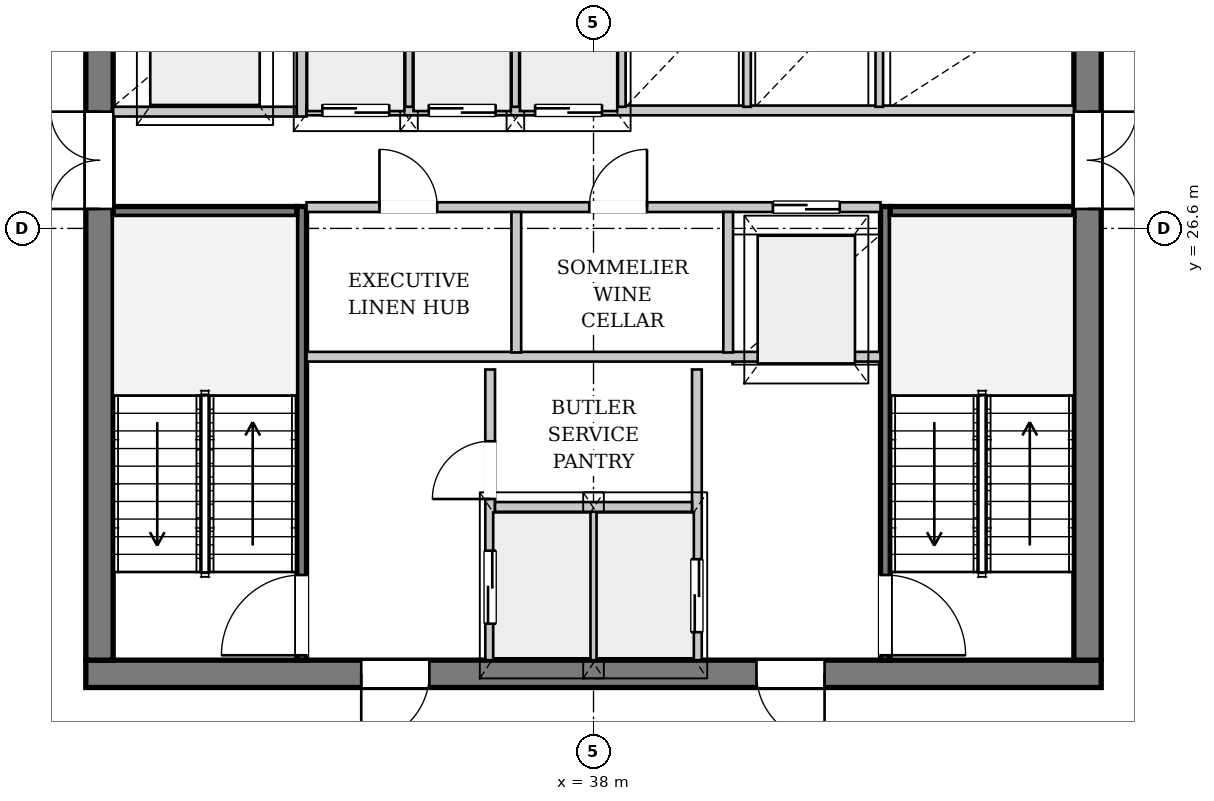
"""IFC4 building model, lengths in metres.
Left out: names, types, materials, properties, quantities, classifications, styles, units other than length and angle.
Written with IfcOpenShell. Run it as: python <this file> out.ifc"""

import sys

from ifc_helpers import new_model, si_unit, direction, frame, frame_2d, origin, place, context, subcontext, project, spatial, rectangle, extrude, source, transform, mapped, element, fill, save


model = new_model("IFC4")
c1 = context("Model", 3, precision=1e-05, world=origin(), true_north=direction((0.0, 1.0)))
c2 = subcontext(c1, "Body", "Model", "MODEL_VIEW")
j1 = project(units=[si_unit("LENGTHUNIT", "METRE"), si_unit("PLANEANGLEUNIT", "RADIAN")], contexts=[c1])
p1 = place(None, origin())
s1 = spatial("IfcSite", under=j1, at=p1, CompositionType="ELEMENT")
p2 = place(p1, origin())
s2 = spatial("IfcBuilding", under=s1, at=p2, CompositionType="ELEMENT")
p3 = place(p2, frame((0.0, 0.0, 216.7)))
s3 = spatial("IfcBuildingStorey", under=s2, at=p3, CompositionType="ELEMENT", Elevation=216.7)
p4 = place(p3, frame((52.937, 23.49, 0.0), z_axis=(0.0, 0.0, 1.0), x_axis=(-0.479001143565, -0.877814276748, 0.0)))
e1 = element("IfcWall", 1, at=p4, inside=s3, PredefinedType="SOLIDWALL", context=c2, shape_type="SweptSolid", body=[
    extrude(rectangle(XDim=23.072, YDim=0.32, at=frame_2d((11.536, 0.0))), origin(), (0.0, 0.0, 1.0), 2.822),
])
p5 = place(p4, frame((6.633, 0.0, 0.0)))
e2 = element("IfcOpeningElement", 2, at=p5, cuts=e1, PredefinedType="OPENING", context=c2, shape_type="SweptSolid", body=[
    extrude(rectangle(XDim=1.5, YDim=2.3, at=frame_2d((0.75, 1.15))), frame((0.0, 0.17, 0.0), z_axis=(0.0, -1.0, 0.0), x_axis=(1.0, 0.0, 0.0)), (0.0, 0.0, 1.0), 0.34),
])
p6 = place(p4, frame((15.773, 0.0, 0.352)))
e3 = element("IfcOpeningElement", 3, at=p6, cuts=e1, PredefinedType="OPENING", context=c2, shape_type="SweptSolid", body=[
    extrude(rectangle(XDim=2.6, YDim=2.35, at=frame_2d((1.3, 1.175))), frame((0.0, 0.17, 0.0), z_axis=(0.0, -1.0, 0.0), x_axis=(1.0, 0.0, 0.0)), (0.0, 0.0, 1.0), 0.34),
])
p7 = place(p3, frame((43.092, 3.473, 0.0), z_axis=(0.0, 0.0, 1.0), x_axis=(0.473808636285, 0.880627830688, 0.0)))
e4 = element("IfcWall", 4, at=p7, inside=s3, PredefinedType="PARAPET", context=c2, shape_type="SweptSolid", body=[
    extrude(rectangle(XDim=20.551, YDim=0.22, at=frame_2d((10.275, 0.0))), origin(), (0.0, 0.0, 1.0), 0.3),
])
p8 = place(p3, frame((46.35, 19.275, 0.0), z_axis=(0.0, 0.0, 1.0), x_axis=(-1.0, 0.0, 0.0)))
e5 = element("IfcWall", 5, at=p8, inside=s3, PredefinedType="SHEAR", context=c2, shape_type="SweptSolid", body=[
    extrude(rectangle(XDim=16.7, YDim=0.45, at=frame_2d((8.35, 0.0))), origin(), (0.0, 0.0, 1.0), 3.33),
])
p9 = place(p8, frame((4.55, 0.0, 0.0)))
e6 = element("IfcOpeningElement", 6, at=p9, cuts=e5, PredefinedType="OPENING", context=c2, shape_type="SweptSolid", body=[
    extrude(rectangle(XDim=1.12, YDim=2.25, at=frame_2d((0.56, 1.125))), frame((0.0, 0.235, 0.0), z_axis=(0.0, -1.0, 0.0), x_axis=(1.0, 0.0, 0.0)), (0.0, 0.0, 1.0), 0.47),
])
p10 = place(p8, frame((11.05, 0.0, 0.0)))
e7 = element("IfcOpeningElement", 7, at=p10, cuts=e5, PredefinedType="OPENING", context=c2, shape_type="SweptSolid", body=[
    extrude(rectangle(XDim=1.12, YDim=2.25, at=frame_2d((0.56, 1.125))), frame((0.0, 0.235, 0.0), z_axis=(0.0, -1.0, 0.0), x_axis=(1.0, 0.0, 0.0)), (0.0, 0.0, 1.0), 0.47),
])
p11 = place(p3, frame((29.875, 19.5, 0.0), z_axis=(0.0, 0.0, 1.0), x_axis=(0.0, 1.0, 0.0)))
e8 = element("IfcWall", 8, at=p11, inside=s3, PredefinedType="SHEAR", context=c2, shape_type="SweptSolid", body=[
    extrude(rectangle(XDim=14.2, YDim=0.45, at=frame_2d((7.1, 0.0))), origin(), (0.0, 0.0, 1.0), 3.33),
])
p12 = place(p11, frame((7.42, 0.0, 0.0)))
e9 = element("IfcOpeningElement", 9, at=p12, cuts=e8, PredefinedType="OPENING", context=c2, shape_type="SweptSolid", body=[
    extrude(rectangle(XDim=1.6, YDim=2.2, at=frame_2d((0.8, 1.1))), frame((0.0, 0.235, 0.0), z_axis=(0.0, -1.0, 0.0), x_axis=(1.0, 0.0, 0.0)), (0.0, 0.0, 1.0), 0.47),
])
p13 = place(p3, frame((46.125, 33.7, 0.0), z_axis=(0.0, 0.0, 1.0), x_axis=(0.0, -1.0, 0.0)))
e10 = element("IfcWall", 10, at=p13, inside=s3, PredefinedType="SHEAR", context=c2, shape_type="SweptSolid", body=[
    extrude(rectangle(XDim=14.2, YDim=0.45, at=frame_2d((7.1, 0.0))), origin(), (0.0, 0.0, 1.0), 3.33),
])
p14 = place(p13, frame((5.18, 0.0, 0.0)))
e11 = element("IfcOpeningElement", 11, at=p14, cuts=e10, PredefinedType="OPENING", context=c2, shape_type="SweptSolid", body=[
    extrude(rectangle(XDim=1.6, YDim=2.2, at=frame_2d((0.8, 1.1))), frame((0.0, 0.235, 0.0), z_axis=(0.0, -1.0, 0.0), x_axis=(1.0, 0.0, 0.0)), (0.0, 0.0, 1.0), 0.47),
])
p15 = place(p13, frame((2.05, 0.0, 0.0)))
e12 = element("IfcOpeningElement", 12, at=p15, cuts=e10, PredefinedType="OPENING", context=c2, shape_type="SweptSolid", body=[
    extrude(rectangle(XDim=0.95, YDim=2.1, at=frame_2d((0.475, 1.05))), frame((0.0, 0.235, 0.0), z_axis=(0.0, -1.0, 0.0), x_axis=(1.0, 0.0, 0.0)), (0.0, 0.0, 1.0), 0.47),
])
p16 = place(p3, frame((33.2, 19.5, 0.0), z_axis=(0.0, 0.0, 1.0), x_axis=(0.0, 1.0, 0.0)))
e13 = element("IfcWall", 13, at=p16, inside=s3, PredefinedType="PARTITIONING", context=c2, shape_type="SweptSolid", body=[
    extrude(rectangle(XDim=7.46, YDim=0.16, at=frame_2d((3.73, 0.0))), origin(), (0.0, 0.0, 1.0), 3.33),
])
p17 = place(p16, frame((0.08, 0.0, 0.0)))
e14 = element("IfcOpeningElement", 14, at=p17, cuts=e13, PredefinedType="OPENING", context=c2, shape_type="SweptSolid", body=[
    extrude(rectangle(XDim=1.32, YDim=2.2, at=frame_2d((0.66, 1.1))), frame((0.0, 0.09, 0.0), z_axis=(0.0, -1.0, 0.0), x_axis=(1.0, 0.0, 0.0)), (0.0, 0.0, 1.0), 0.18),
])
p18 = place(p3, frame((30.1, 26.88, 0.0), z_axis=(0.0, 0.0, 1.0), x_axis=(1.0, 0.0, 0.0)))
e15 = element("IfcWall", 15, at=p18, inside=s3, PredefinedType="PARTITIONING", context=c2, shape_type="SweptSolid", body=[
    extrude(rectangle(XDim=3.02, YDim=0.16, at=frame_2d((1.51, 0.0))), origin(), (0.0, 0.0, 1.0), 3.33),
])
p19 = place(p3, frame((42.8, 26.96, 0.0), z_axis=(0.0, 0.0, 1.0), x_axis=(0.0, -1.0, 0.0)))
e16 = element("IfcWall", 16, at=p19, inside=s3, PredefinedType="PARTITIONING", context=c2, shape_type="SweptSolid", body=[
    extrude(rectangle(XDim=7.46, YDim=0.16, at=frame_2d((3.73, 0.0))), origin(), (0.0, 0.0, 1.0), 3.33),
])
p20 = place(p19, frame((6.06, 0.0, 0.0)))
e17 = element("IfcOpeningElement", 17, at=p20, cuts=e16, PredefinedType="OPENING", context=c2, shape_type="SweptSolid", body=[
    extrude(rectangle(XDim=1.32, YDim=2.2, at=frame_2d((0.66, 1.1))), frame((0.0, 0.09, 0.0), z_axis=(0.0, -1.0, 0.0), x_axis=(1.0, 0.0, 0.0)), (0.0, 0.0, 1.0), 0.18),
])
p21 = place(p3, frame((42.88, 26.88, 0.0), z_axis=(0.0, 0.0, 1.0), x_axis=(1.0, 0.0, 0.0)))
e18 = element("IfcWall", 18, at=p21, inside=s3, PredefinedType="PARTITIONING", context=c2, shape_type="SweptSolid", body=[
    extrude(rectangle(XDim=3.02, YDim=0.16, at=frame_2d((1.51, 0.0))), origin(), (0.0, 0.0, 1.0), 3.33),
])
p22 = place(p3, frame((36.3, 19.5, 0.0), z_axis=(0.0, 0.0, 1.0), x_axis=(0.0, 1.0, 0.0)))
e19 = element("IfcWall", 19, at=p22, inside=s3, PredefinedType="PARTITIONING", context=c2, shape_type="SweptSolid", body=[
    extrude(rectangle(XDim=4.78, YDim=0.16, at=frame_2d((2.39, 0.0))), origin(), (0.0, 0.0, 1.0), 3.33),
])
p23 = place(p22, frame((0.6, 0.0, 0.0)))
e20 = element("IfcOpeningElement", 20, at=p23, cuts=e19, PredefinedType="OPENING", context=c2, shape_type="SweptSolid", body=[
    extrude(rectangle(XDim=1.2, YDim=2.2, at=frame_2d((0.6, 1.1))), frame((0.0, 0.09, 0.0), z_axis=(0.0, -1.0, 0.0), x_axis=(1.0, 0.0, 0.0)), (0.0, 0.0, 1.0), 0.18),
])
p24 = place(p22, frame((2.65, 0.0, 0.0)))
e21 = element("IfcOpeningElement", 21, at=p24, cuts=e19, PredefinedType="OPENING", context=c2, shape_type="SweptSolid", body=[
    extrude(rectangle(XDim=0.95, YDim=2.1, at=frame_2d((0.475, 1.05))), frame((0.0, 0.09, 0.0), z_axis=(0.0, -1.0, 0.0), x_axis=(1.0, 0.0, 0.0)), (0.0, 0.0, 1.0), 0.18),
])
p25 = place(p3, frame((39.7, 24.28, 0.0), z_axis=(0.0, 0.0, 1.0), x_axis=(0.0, -1.0, 0.0)))
e22 = element("IfcWall", 22, at=p25, inside=s3, PredefinedType="PARTITIONING", context=c2, shape_type="SweptSolid", body=[
    extrude(rectangle(XDim=4.78, YDim=0.16, at=frame_2d((2.39, 0.0))), origin(), (0.0, 0.0, 1.0), 3.33),
])
p26 = place(p25, frame((3.12, 0.0, 0.0)))
e23 = element("IfcOpeningElement", 23, at=p26, cuts=e22, PredefinedType="OPENING", context=c2, shape_type="SweptSolid", body=[
    extrude(rectangle(XDim=1.2, YDim=2.2, at=frame_2d((0.6, 1.1))), frame((0.0, 0.09, 0.0), z_axis=(0.0, -1.0, 0.0), x_axis=(1.0, 0.0, 0.0)), (0.0, 0.0, 1.0), 0.18),
])
p27 = place(p3, frame((38.0, 19.5, 0.0), z_axis=(0.0, 0.0, 1.0), x_axis=(0.0, 1.0, 0.0)))
e24 = element("IfcWall", 24, at=p27, inside=s3, PredefinedType="PARTITIONING", context=c2, shape_type="SweptSolid", body=[
    extrude(rectangle(XDim=2.46, YDim=0.125, at=frame_2d((1.23, 0.0))), origin(), (0.0, 0.0, 1.0), 3.33),
])
p28 = place(p3, frame((36.38, 22.02, 0.0), z_axis=(0.0, 0.0, 1.0), x_axis=(1.0, 0.0, 0.0)))
e25 = element("IfcWall", 25, at=p28, inside=s3, PredefinedType="PARTITIONING", context=c2, shape_type="SweptSolid", body=[
    extrude(rectangle(XDim=3.24, YDim=0.16, at=frame_2d((1.62, 0.0))), origin(), (0.0, 0.0, 1.0), 3.33),
])
p29 = place(p3, frame((33.28, 24.49, 0.0), z_axis=(0.0, 0.0, 1.0), x_axis=(1.0, 0.0, 0.0)))
e26 = element("IfcWall", 26, at=p29, inside=s3, PredefinedType="PARTITIONING", context=c2, shape_type="SweptSolid", body=[
    extrude(rectangle(XDim=9.44, YDim=0.16, at=frame_2d((4.72, 0.0))), origin(), (0.0, 0.0, 1.0), 3.33),
])
p30 = place(p3, frame((30.1, 28.52, 0.0), z_axis=(0.0, 0.0, 1.0), x_axis=(1.0, 0.0, 0.0)))
e27 = element("IfcWall", 27, at=p30, inside=s3, PredefinedType="PARTITIONING", context=c2, shape_type="SweptSolid", body=[
    extrude(rectangle(XDim=3.02, YDim=0.16, at=frame_2d((1.51, 0.0))), origin(), (0.0, 0.0, 1.0), 3.33),
])
p31 = place(p3, frame((33.2, 28.44, 0.0), z_axis=(0.0, 0.0, 1.0), x_axis=(0.0, 1.0, 0.0)))
e28 = element("IfcWall", 28, at=p31, inside=s3, PredefinedType="PARTITIONING", context=c2, shape_type="SweptSolid", body=[
    extrude(rectangle(XDim=5.26, YDim=0.16, at=frame_2d((2.63, 0.0))), origin(), (0.0, 0.0, 1.0), 3.33),
])
p32 = place(p3, frame((33.28, 26.95, 0.0), z_axis=(0.0, 0.0, 1.0), x_axis=(1.0, 0.0, 0.0)))
e29 = element("IfcWall", 29, at=p32, inside=s3, PredefinedType="PARTITIONING", context=c2, shape_type="SweptSolid", body=[
    extrude(rectangle(XDim=9.44, YDim=0.16, at=frame_2d((4.72, 0.0))), origin(), (0.0, 0.0, 1.0), 3.33),
])
p33 = place(p32, frame((1.2, 0.0, 0.0)))
e30 = element("IfcOpeningElement", 30, at=p33, cuts=e29, PredefinedType="OPENING", context=c2, shape_type="SweptSolid", body=[
    extrude(rectangle(XDim=0.95, YDim=2.1, at=frame_2d((0.475, 1.05))), frame((0.0, 0.09, 0.0), z_axis=(0.0, -1.0, 0.0), x_axis=(1.0, 0.0, 0.0)), (0.0, 0.0, 1.0), 0.18),
])
p34 = place(p32, frame((4.65, 0.0, 0.0)))
e31 = element("IfcOpeningElement", 31, at=p34, cuts=e29, PredefinedType="OPENING", context=c2, shape_type="SweptSolid", body=[
    extrude(rectangle(XDim=0.95, YDim=2.1, at=frame_2d((0.475, 1.05))), frame((0.0, 0.09, 0.0), z_axis=(0.0, -1.0, 0.0), x_axis=(1.0, 0.0, 0.0)), (0.0, 0.0, 1.0), 0.18),
])
p35 = place(p32, frame((7.67, 0.0, 0.0)))
e32 = element("IfcOpeningElement", 32, at=p35, cuts=e29, PredefinedType="OPENING", context=c2, shape_type="SweptSolid", body=[
    extrude(rectangle(XDim=1.1, YDim=2.2, at=frame_2d((0.55, 1.1))), frame((0.0, 0.09, 0.0), z_axis=(0.0, -1.0, 0.0), x_axis=(1.0, 0.0, 0.0)), (0.0, 0.0, 1.0), 0.18),
])
for number, where, z_axis, x_axis in (
    (33, (36.73, 24.56, 0.0), (0.0, 0.0, 1.0), (0.0, 1.0, 0.0)),
    (34, (40.215, 24.56, 0.0), (0.0, 0.0, 1.0), (0.0, 1.0, 0.0)),
):
    element("IfcWall", number, at=place(p3, frame(where, z_axis=z_axis, x_axis=x_axis)), inside=s3, PredefinedType="PARTITIONING", context=c2, shape_type="SweptSolid", body=[
        extrude(rectangle(XDim=2.31, YDim=0.16, at=frame_2d((1.155, 0.0))), origin(), (0.0, 0.0, 1.0), 3.33),
    ])
p36 = place(p3, frame((33.28, 28.54, 0.0), z_axis=(0.0, 0.0, 1.0), x_axis=(1.0, 0.0, 0.0)))
e35 = element("IfcWall", 35, at=p36, inside=s3, PredefinedType="PARTITIONING", context=c2, shape_type="SweptSolid", body=[
    extrude(rectangle(XDim=12.62, YDim=0.16, at=frame_2d((6.31, 0.0))), origin(), (0.0, 0.0, 1.0), 3.33),
])
p37 = place(p36, frame((0.26, 0.0, 0.0)))
e36 = element("IfcOpeningElement", 36, at=p37, cuts=e35, PredefinedType="OPENING", context=c2, shape_type="SweptSolid", body=[
    extrude(rectangle(XDim=1.1, YDim=2.2, at=frame_2d((0.55, 1.1))), frame((0.0, 0.09, 0.0), z_axis=(0.0, -1.0, 0.0), x_axis=(1.0, 0.0, 0.0)), (0.0, 0.0, 1.0), 0.18),
])
p38 = place(p36, frame((2.01, 0.0, 0.0)))
e37 = element("IfcOpeningElement", 37, at=p38, cuts=e35, PredefinedType="OPENING", context=c2, shape_type="SweptSolid", body=[
    extrude(rectangle(XDim=1.1, YDim=2.2, at=frame_2d((0.55, 1.1))), frame((0.0, 0.09, 0.0), z_axis=(0.0, -1.0, 0.0), x_axis=(1.0, 0.0, 0.0)), (0.0, 0.0, 1.0), 0.18),
])
p39 = place(p36, frame((3.76, 0.0, 0.0)))
e38 = element("IfcOpeningElement", 38, at=p39, cuts=e35, PredefinedType="OPENING", context=c2, shape_type="SweptSolid", body=[
    extrude(rectangle(XDim=1.1, YDim=2.2, at=frame_2d((0.55, 1.1))), frame((0.0, 0.09, 0.0), z_axis=(0.0, -1.0, 0.0), x_axis=(1.0, 0.0, 0.0)), (0.0, 0.0, 1.0), 0.18),
])
for number, where, z_axis, x_axis in (
    (39, (34.965, 28.6, 0.0), (0.0, 0.0, 1.0), (0.0, 1.0, 0.0)),
    (40, (36.715, 28.6, 0.0), (0.0, 0.0, 1.0), (0.0, 1.0, 0.0)),
    (41, (38.465, 28.6, 0.0), (0.0, 0.0, 1.0), (0.0, 1.0, 0.0)),
    (42, (40.525, 28.6, 0.0), (0.0, 0.0, 1.0), (0.0, 1.0, 0.0)),
    (43, (42.7, 28.6, 0.0), (0.0, 0.0, 1.0), (0.0, 1.0, 0.0)),
):
    element("IfcWall", number, at=place(p3, frame(where, z_axis=z_axis, x_axis=x_axis)), inside=s3, PredefinedType="PARTITIONING", context=c2, shape_type="SweptSolid", body=[
        extrude(rectangle(XDim=1.92, YDim=0.125, at=frame_2d((0.96, 0.0))), origin(), (0.0, 0.0, 1.0), 3.33),
    ])
m1 = source(origin(), c2, "Body", "SweptSolid", [
    extrude(rectangle(XDim=1.12, YDim=2.25, at=frame_2d((0.56, 1.125))), frame((0.0, 0.025, 0.0), z_axis=(0.0, -1.0, 0.0), x_axis=(1.0, 0.0, 0.0)), (0.0, 0.0, 1.0), 0.05),
])
p40 = place(p9, origin())
e44 = element("IfcDoor", 44, at=p40, inside=s3, OperationType="SINGLE_SWING_LEFT", PredefinedType="DOOR", context=c2, shape_type="MappedRepresentation", body=[
    mapped(m1, transform((0.0, 0.0, 0.0), x_axis=(1.0, 0.0, 0.0), y_axis=(0.0, 1.0, 0.0), z_axis=(0.0, 0.0, 1.0), scale=1.0)),
])
fill(e6, e44)
p41 = place(p10, origin())
e45 = element("IfcDoor", 45, at=p41, inside=s3, OperationType="SINGLE_SWING_RIGHT", PredefinedType="DOOR", context=c2, shape_type="MappedRepresentation", body=[
    mapped(m1, transform((0.0, 0.0, 0.0), x_axis=(1.0, 0.0, 0.0), y_axis=(0.0, 1.0, 0.0), z_axis=(0.0, 0.0, 1.0), scale=1.0)),
])
fill(e7, e45)
m2 = source(origin(), c2, "Body", "SweptSolid", [
    extrude(rectangle(XDim=1.6, YDim=2.2, at=frame_2d((0.8, 1.1))), frame((0.0, 0.025, 0.0), z_axis=(0.0, -1.0, 0.0), x_axis=(1.0, 0.0, 0.0)), (0.0, 0.0, 1.0), 0.05),
])
p42 = place(p12, origin())
e46 = element("IfcDoor", 46, at=p42, inside=s3, OperationType="DOUBLE_DOOR_SINGLE_SWING", PredefinedType="DOOR", context=c2, shape_type="MappedRepresentation", body=[
    mapped(m2, transform((0.0, 0.0, 0.0), x_axis=(1.0, 0.0, 0.0), y_axis=(0.0, 1.0, 0.0), z_axis=(0.0, 0.0, 1.0), scale=1.0)),
])
fill(e9, e46)
p43 = place(p14, origin())
e47 = element("IfcDoor", 47, at=p43, inside=s3, OperationType="DOUBLE_DOOR_SINGLE_SWING", PredefinedType="DOOR", context=c2, shape_type="MappedRepresentation", body=[
    mapped(m2, transform((0.0, 0.0, 0.0), x_axis=(1.0, 0.0, 0.0), y_axis=(0.0, 1.0, 0.0), z_axis=(0.0, 0.0, 1.0), scale=1.0)),
])
fill(e11, e47)
m3 = source(origin(), c2, "Body", "SweptSolid", [
    extrude(rectangle(XDim=1.32, YDim=2.2, at=frame_2d((0.66, 1.1))), frame((0.0, 0.025, 0.0), z_axis=(0.0, -1.0, 0.0), x_axis=(1.0, 0.0, 0.0)), (0.0, 0.0, 1.0), 0.05),
])
p44 = place(p17, origin())
e48 = element("IfcDoor", 48, at=p44, inside=s3, OperationType="SINGLE_SWING_LEFT", PredefinedType="DOOR", context=c2, shape_type="MappedRepresentation", body=[
    mapped(m3, transform((0.0, 0.0, 0.0), x_axis=(1.0, 0.0, 0.0), y_axis=(0.0, 1.0, 0.0), z_axis=(0.0, 0.0, 1.0), scale=1.0)),
])
fill(e14, e48)
p45 = place(p20, origin())
e49 = element("IfcDoor", 49, at=p45, inside=s3, OperationType="SINGLE_SWING_RIGHT", PredefinedType="DOOR", context=c2, shape_type="MappedRepresentation", body=[
    mapped(m3, transform((0.0, 0.0, 0.0), x_axis=(1.0, 0.0, 0.0), y_axis=(0.0, 1.0, 0.0), z_axis=(0.0, 0.0, 1.0), scale=1.0)),
])
fill(e17, e49)
m4 = source(origin(), c2, "Body", "SweptSolid", [
    extrude(rectangle(XDim=1.2, YDim=2.2, at=frame_2d((0.6, 1.1))), frame((0.0, 0.025, 0.0), z_axis=(0.0, -1.0, 0.0), x_axis=(1.0, 0.0, 0.0)), (0.0, 0.0, 1.0), 0.05),
])
p46 = place(p23, origin())
e50 = element("IfcDoor", 50, at=p46, inside=s3, OperationType="DOUBLE_DOOR_SLIDING", PredefinedType="DOOR", context=c2, shape_type="MappedRepresentation", body=[
    mapped(m4, transform((0.0, 0.0, 0.0), x_axis=(1.0, 0.0, 0.0), y_axis=(0.0, 1.0, 0.0), z_axis=(0.0, 0.0, 1.0), scale=1.0)),
])
fill(e20, e50)
m5 = source(origin(), c2, "Body", "SweptSolid", [
    extrude(rectangle(XDim=0.95, YDim=2.1, at=frame_2d((0.475, 1.05))), frame((0.0, 0.025, 0.0), z_axis=(0.0, -1.0, 0.0), x_axis=(1.0, 0.0, 0.0)), (0.0, 0.0, 1.0), 0.05),
])
p47 = place(p24, origin())
e51 = element("IfcDoor", 51, at=p47, inside=s3, OperationType="SINGLE_SWING_LEFT", PredefinedType="DOOR", context=c2, shape_type="MappedRepresentation", body=[
    mapped(m5, transform((0.0, 0.0, 0.0), x_axis=(1.0, 0.0, 0.0), y_axis=(0.0, 1.0, 0.0), z_axis=(0.0, 0.0, 1.0), scale=1.0)),
])
fill(e21, e51)
p48 = place(p26, origin())
e52 = element("IfcDoor", 52, at=p48, inside=s3, OperationType="DOUBLE_DOOR_SLIDING", PredefinedType="DOOR", context=c2, shape_type="MappedRepresentation", body=[
    mapped(m4, transform((0.0, 0.0, 0.0), x_axis=(1.0, 0.0, 0.0), y_axis=(0.0, 1.0, 0.0), z_axis=(0.0, 0.0, 1.0), scale=1.0)),
])
fill(e23, e52)
p49 = place(p33, origin())
e53 = element("IfcDoor", 53, at=p49, inside=s3, OperationType="SINGLE_SWING_LEFT", PredefinedType="DOOR", context=c2, shape_type="MappedRepresentation", body=[
    mapped(m5, transform((0.0, 0.0, 0.0), x_axis=(1.0, 0.0, 0.0), y_axis=(0.0, 1.0, 0.0), z_axis=(0.0, 0.0, 1.0), scale=1.0)),
])
fill(e30, e53)
p50 = place(p34, origin())
e54 = element("IfcDoor", 54, at=p50, inside=s3, OperationType="SINGLE_SWING_RIGHT", PredefinedType="DOOR", context=c2, shape_type="MappedRepresentation", body=[
    mapped(m5, transform((0.0, 0.0, 0.0), x_axis=(1.0, 0.0, 0.0), y_axis=(0.0, 1.0, 0.0), z_axis=(0.0, 0.0, 1.0), scale=1.0)),
])
fill(e31, e54)
m6 = source(origin(), c2, "Body", "SweptSolid", [
    extrude(rectangle(XDim=1.1, YDim=2.2, at=frame_2d((0.55, 1.1))), frame((0.0, 0.025, 0.0), z_axis=(0.0, -1.0, 0.0), x_axis=(1.0, 0.0, 0.0)), (0.0, 0.0, 1.0), 0.05),
])
p51 = place(p35, origin())
e55 = element("IfcDoor", 55, at=p51, inside=s3, OperationType="DOUBLE_DOOR_SLIDING", PredefinedType="DOOR", context=c2, shape_type="MappedRepresentation", body=[
    mapped(m6, transform((0.0, 0.0, 0.0), x_axis=(1.0, 0.0, 0.0), y_axis=(0.0, 1.0, 0.0), z_axis=(0.0, 0.0, 1.0), scale=1.0)),
])
fill(e32, e55)
p52 = place(p37, origin())
e56 = element("IfcDoor", 56, at=p52, inside=s3, OperationType="DOUBLE_DOOR_SLIDING", PredefinedType="DOOR", context=c2, shape_type="MappedRepresentation", body=[
    mapped(m6, transform((0.0, 0.0, 0.0), x_axis=(1.0, 0.0, 0.0), y_axis=(0.0, 1.0, 0.0), z_axis=(0.0, 0.0, 1.0), scale=1.0)),
])
fill(e36, e56)
p53 = place(p38, origin())
e57 = element("IfcDoor", 57, at=p53, inside=s3, OperationType="DOUBLE_DOOR_SLIDING", PredefinedType="DOOR", context=c2, shape_type="MappedRepresentation", body=[
    mapped(m6, transform((0.0, 0.0, 0.0), x_axis=(1.0, 0.0, 0.0), y_axis=(0.0, 1.0, 0.0), z_axis=(0.0, 0.0, 1.0), scale=1.0)),
])
fill(e37, e57)
p54 = place(p39, origin())
e58 = element("IfcDoor", 58, at=p54, inside=s3, OperationType="DOUBLE_DOOR_SLIDING", PredefinedType="DOOR", context=c2, shape_type="MappedRepresentation", body=[
    mapped(m6, transform((0.0, 0.0, 0.0), x_axis=(1.0, 0.0, 0.0), y_axis=(0.0, 1.0, 0.0), z_axis=(0.0, 0.0, 1.0), scale=1.0)),
])
fill(e38, e58)
save(model, sys.argv[1])
